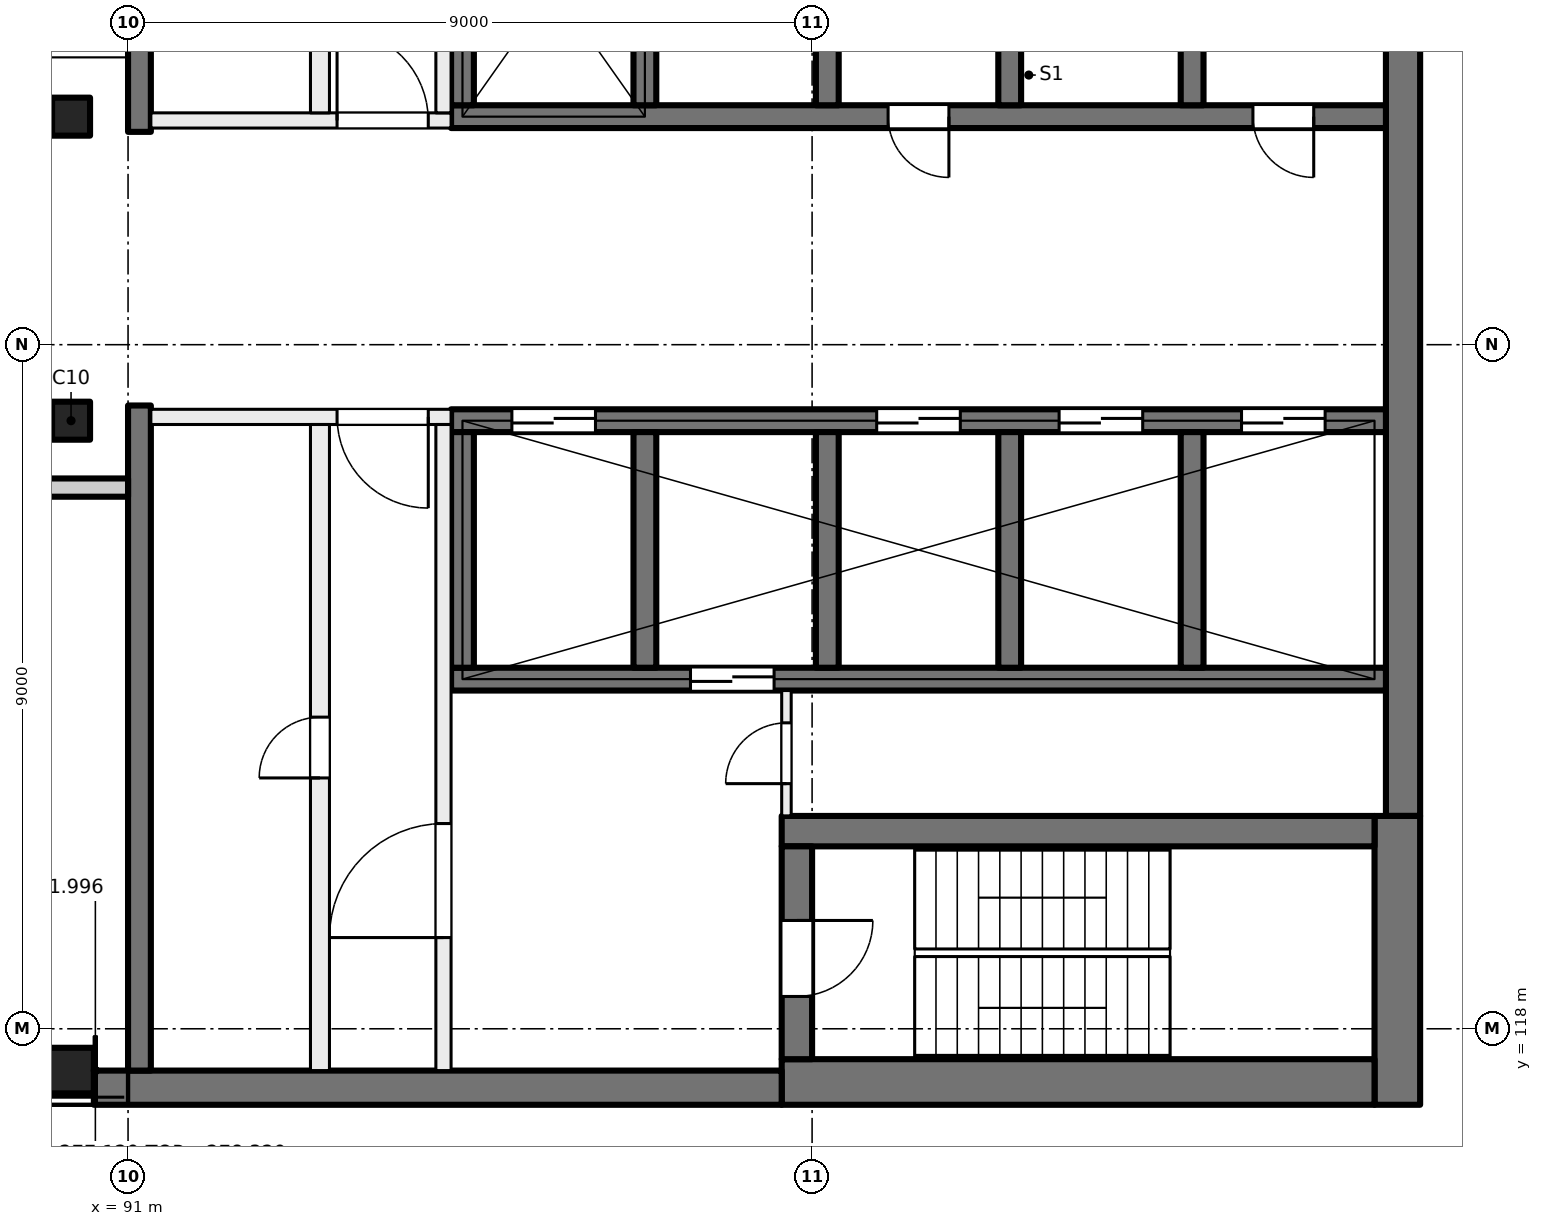
"""IFC4 building model, lengths in metres.
Left out: names, types, materials, properties, quantities, classifications, styles, units other than length and angle.
Written with IfcOpenShell. Run it as: python <this file> out.ifc"""

import sys

from ifc_helpers import new_model, si_unit, direction, frame, frame_2d, origin, origin_2d, place, context, subcontext, project, spatial, rectangle, extrude, element, fill, save


model = new_model("IFC4")
c1 = context("Model", 3, precision=1e-05, world=origin(), true_north=direction((0.0, 1.0)))
c2 = subcontext(c1, "Body", "Model", "MODEL_VIEW")
j1 = project(units=[si_unit("LENGTHUNIT", "METRE"), si_unit("PLANEANGLEUNIT", "RADIAN")], contexts=[c1])
p1 = place(None, origin())
s1 = spatial("IfcSite", under=j1, at=p1, CompositionType="ELEMENT")
p2 = place(p1, origin())
s2 = spatial("IfcBuilding", under=s1, at=p2, CompositionType="ELEMENT")
p3 = place(p2, frame((0.0, 0.0, 277.5)))
s3 = spatial("IfcBuildingStorey", under=s2, at=p3, CompositionType="ELEMENT", Elevation=277.5)
for number, where, z_axis, x_axis in (
    (1, (90.25, 130.0, 0.0), (0.0, 0.0, 1.0), (1.0, 0.0, 0.0)),
    (2, (90.25, 126.0, 0.0), (0.0, 0.0, 1.0), (1.0, 0.0, 0.0)),
):
    element("IfcColumn", number, at=place(p3, frame(where, z_axis=z_axis, x_axis=x_axis)), inside=s3, PredefinedType="COLUMN", context=c2, shape_type="SweptSolid", body=[
        extrude(rectangle(XDim=0.5, YDim=0.5, at=origin_2d()), origin(), (0.0, 0.0, 1.0), 4.5),
    ])
p4 = place(p3, frame((90.25, 117.45, 0.0), z_axis=(0.0, 0.0, 1.0), x_axis=(1.0, 0.0, 0.0)))
e3 = element("IfcColumn", 3, at=p4, inside=s3, PredefinedType="COLUMN", context=c2, shape_type="SweptSolid", body=[
    extrude(rectangle(XDim=0.6, YDim=0.6, at=origin_2d()), origin(), (0.0, 0.0, 1.0), 4.5),
])
p5 = place(p3, frame((107.775, 135.2, 0.0), z_axis=(0.0, 0.0, 1.0), x_axis=(0.0, -1.0, 0.0)))
e4 = element("IfcWall", 4, at=p5, inside=s3, PredefinedType="SHEAR", context=c2, shape_type="SweptSolid", body=[
    extrude(rectangle(XDim=14.4, YDim=0.45, at=frame_2d((7.2, 0.0))), origin(), (0.0, 0.0, 1.0), 4.5),
])
p6 = place(p3, frame((107.7, 120.8, 0.0), z_axis=(0.0, 0.0, 1.0), x_axis=(0.0, -1.0, 0.0)))
e5 = element("IfcWall", 5, at=p6, inside=s3, PredefinedType="SHEAR", context=c2, shape_type="SweptSolid", body=[
    extrude(rectangle(XDim=3.8, YDim=0.6, at=frame_2d((1.9, 0.0))), origin(), (0.0, 0.0, 1.0), 4.5),
])
p7 = place(p3, frame((107.4, 117.3, 0.0), z_axis=(0.0, 0.0, 1.0), x_axis=(-1.0, 0.0, 0.0)))
e6 = element("IfcWall", 6, at=p7, inside=s3, PredefinedType="SHEAR", context=c2, shape_type="SweptSolid", body=[
    extrude(rectangle(XDim=7.8, YDim=0.6, at=frame_2d((3.9, 0.0))), origin(), (0.0, 0.0, 1.0), 4.5),
])
p8 = place(p3, frame((99.6, 117.225, 0.0), z_axis=(0.0, 0.0, 1.0), x_axis=(-1.0, 0.0, 0.0)))
e7 = element("IfcWall", 7, at=p8, inside=s3, PredefinedType="SHEAR", context=c2, shape_type="SweptSolid", body=[
    extrude(rectangle(XDim=9.05, YDim=0.45, at=frame_2d((4.525, 0.0))), origin(), (0.0, 0.0, 1.0), 4.5),
])
p9 = place(p3, frame((107.4, 120.6, 0.0), z_axis=(0.0, 0.0, 1.0), x_axis=(-1.0, 0.0, 0.0)))
e8 = element("IfcWall", 8, at=p9, inside=s3, PredefinedType="SHEAR", context=c2, shape_type="SweptSolid", body=[
    extrude(rectangle(XDim=7.8, YDim=0.4, at=frame_2d((3.9, 0.0))), origin(), (0.0, 0.0, 1.0), 4.5),
])
p10 = place(p3, frame((99.8, 120.4, 0.0), z_axis=(0.0, 0.0, 1.0), x_axis=(0.0, -1.0, 0.0)))
e9 = element("IfcWall", 9, at=p10, inside=s3, PredefinedType="SHEAR", context=c2, shape_type="SweptSolid", body=[
    extrude(rectangle(XDim=2.8, YDim=0.4, at=frame_2d((1.4, 0.0))), origin(), (0.0, 0.0, 1.0), 4.5),
])
p11 = place(p10, frame((0.975, 0.0, 0.0)))
e10 = element("IfcOpeningElement", 10, at=p11, cuts=e9, PredefinedType="OPENING", context=c2, shape_type="SweptSolid", body=[
    extrude(rectangle(XDim=1.0, YDim=2.1, at=frame_2d((0.5, 1.05))), frame((0.0, 0.21, 0.0), z_axis=(0.0, -1.0, 0.0), x_axis=(1.0, 0.0, 0.0)), (0.0, 0.0, 1.0), 0.42),
])
p12 = place(p3, frame((107.55, 130.0, 0.0), z_axis=(0.0, 0.0, 1.0), x_axis=(-1.0, 0.0, 0.0)))
e11 = element("IfcWall", 11, at=p12, inside=s3, PredefinedType="SHEAR", context=c2, shape_type="SweptSolid", body=[
    extrude(rectangle(XDim=12.3, YDim=0.3, at=frame_2d((6.15, 0.0))), origin(), (0.0, 0.0, 1.0), 4.5),
])
p13 = place(p12, frame((0.95, 0.0, 0.0)))
e12 = element("IfcOpeningElement", 12, at=p13, cuts=e11, PredefinedType="OPENING", context=c2, shape_type="SweptSolid", body=[
    extrude(rectangle(XDim=0.8, YDim=2.1, at=frame_2d((0.4, 1.05))), frame((0.0, 0.16, 0.0), z_axis=(0.0, -1.0, 0.0), x_axis=(1.0, 0.0, 0.0)), (0.0, 0.0, 1.0), 0.32),
])
p14 = place(p12, frame((5.75, 0.0, 0.0)))
e13 = element("IfcOpeningElement", 13, at=p14, cuts=e11, PredefinedType="OPENING", context=c2, shape_type="SweptSolid", body=[
    extrude(rectangle(XDim=0.8, YDim=2.1, at=frame_2d((0.4, 1.05))), frame((0.0, 0.16, 0.0), z_axis=(0.0, -1.0, 0.0), x_axis=(1.0, 0.0, 0.0)), (0.0, 0.0, 1.0), 0.32),
])
for number, where, z_axis, x_axis in (
    (14, (105.0, 133.25, 0.0), (0.0, 0.0, 1.0), (0.0, -1.0, 0.0)),
    (15, (102.6, 133.25, 0.0), (0.0, 0.0, 1.0), (0.0, -1.0, 0.0)),
    (16, (100.2, 133.25, 0.0), (0.0, 0.0, 1.0), (0.0, -1.0, 0.0)),
    (17, (97.8, 133.25, 0.0), (0.0, 0.0, 1.0), (0.0, -1.0, 0.0)),
    (18, (95.4, 133.25, 0.0), (0.0, 0.0, 1.0), (0.0, -1.0, 0.0)),
):
    element("IfcWall", number, at=place(p3, frame(where, z_axis=z_axis, x_axis=x_axis)), inside=s3, PredefinedType="SHEAR", context=c2, shape_type="SweptSolid", body=[
        extrude(rectangle(XDim=3.1, YDim=0.3, at=frame_2d((1.55, 0.0))), origin(), (0.0, 0.0, 1.0), 4.5),
    ])
p15 = place(p3, frame((107.55, 126.0, 0.0), z_axis=(0.0, 0.0, 1.0), x_axis=(-1.0, 0.0, 0.0)))
e19 = element("IfcWall", 19, at=p15, inside=s3, PredefinedType="SHEAR", context=c2, shape_type="SweptSolid", body=[
    extrude(rectangle(XDim=12.3, YDim=0.3, at=frame_2d((6.15, 0.0))), origin(), (0.0, 0.0, 1.0), 4.5),
])
p16 = place(p15, frame((0.8, 0.0, 0.0)))
e20 = element("IfcOpeningElement", 20, at=p16, cuts=e19, PredefinedType="OPENING", context=c2, shape_type="SweptSolid", body=[
    extrude(rectangle(XDim=1.1, YDim=2.1, at=frame_2d((0.55, 1.05))), frame((0.0, 0.16, 0.0), z_axis=(0.0, -1.0, 0.0), x_axis=(1.0, 0.0, 0.0)), (0.0, 0.0, 1.0), 0.32),
])
p17 = place(p15, frame((3.2, 0.0, 0.0)))
e21 = element("IfcOpeningElement", 21, at=p17, cuts=e19, PredefinedType="OPENING", context=c2, shape_type="SweptSolid", body=[
    extrude(rectangle(XDim=1.1, YDim=2.1, at=frame_2d((0.55, 1.05))), frame((0.0, 0.16, 0.0), z_axis=(0.0, -1.0, 0.0), x_axis=(1.0, 0.0, 0.0)), (0.0, 0.0, 1.0), 0.32),
])
p18 = place(p15, frame((5.6, 0.0, 0.0)))
e22 = element("IfcOpeningElement", 22, at=p18, cuts=e19, PredefinedType="OPENING", context=c2, shape_type="SweptSolid", body=[
    extrude(rectangle(XDim=1.1, YDim=2.1, at=frame_2d((0.55, 1.05))), frame((0.0, 0.16, 0.0), z_axis=(0.0, -1.0, 0.0), x_axis=(1.0, 0.0, 0.0)), (0.0, 0.0, 1.0), 0.32),
])
p19 = place(p15, frame((10.4, 0.0, 0.0)))
e23 = element("IfcOpeningElement", 23, at=p19, cuts=e19, PredefinedType="OPENING", context=c2, shape_type="SweptSolid", body=[
    extrude(rectangle(XDim=1.1, YDim=2.1, at=frame_2d((0.55, 1.05))), frame((0.0, 0.16, 0.0), z_axis=(0.0, -1.0, 0.0), x_axis=(1.0, 0.0, 0.0)), (0.0, 0.0, 1.0), 0.32),
])
p20 = place(p3, frame((107.55, 122.6, 0.0), z_axis=(0.0, 0.0, 1.0), x_axis=(-1.0, 0.0, 0.0)))
e24 = element("IfcWall", 24, at=p20, inside=s3, PredefinedType="SHEAR", context=c2, shape_type="SweptSolid", body=[
    extrude(rectangle(XDim=12.3, YDim=0.3, at=frame_2d((6.15, 0.0))), origin(), (0.0, 0.0, 1.0), 4.5),
])
p21 = place(p20, frame((8.05, 0.0, 0.0)))
e25 = element("IfcOpeningElement", 25, at=p21, cuts=e24, PredefinedType="OPENING", context=c2, shape_type="SweptSolid", body=[
    extrude(rectangle(XDim=1.1, YDim=2.1, at=frame_2d((0.55, 1.05))), frame((0.0, 0.16, 0.0), z_axis=(0.0, -1.0, 0.0), x_axis=(1.0, 0.0, 0.0)), (0.0, 0.0, 1.0), 0.32),
])
for number, where, z_axis, x_axis in (
    (26, (105.0, 125.85, 0.0), (0.0, 0.0, 1.0), (0.0, -1.0, 0.0)),
    (27, (102.6, 125.85, 0.0), (0.0, 0.0, 1.0), (0.0, -1.0, 0.0)),
    (28, (100.2, 125.85, 0.0), (0.0, 0.0, 1.0), (0.0, -1.0, 0.0)),
    (29, (97.8, 125.85, 0.0), (0.0, 0.0, 1.0), (0.0, -1.0, 0.0)),
    (30, (95.4, 125.85, 0.0), (0.0, 0.0, 1.0), (0.0, -1.0, 0.0)),
):
    element("IfcWall", number, at=place(p3, frame(where, z_axis=z_axis, x_axis=x_axis)), inside=s3, PredefinedType="SHEAR", context=c2, shape_type="SweptSolid", body=[
        extrude(rectangle(XDim=3.1, YDim=0.3, at=frame_2d((1.55, 0.0))), origin(), (0.0, 0.0, 1.0), 4.5),
    ])
for number, where, z_axis, x_axis in (
    (31, (91.15, 138.55, 0.0), (0.0, 0.0, 1.0), (0.0, -1.0, 0.0)),
    (32, (91.15, 126.2, 0.0), (0.0, 0.0, 1.0), (0.0, -1.0, 0.0)),
):
    element("IfcWall", number, at=place(p3, frame(where, z_axis=z_axis, x_axis=x_axis)), inside=s3, PredefinedType="SHEAR", context=c2, shape_type="SweptSolid", body=[
        extrude(rectangle(XDim=8.75, YDim=0.3, at=frame_2d((4.375, 0.0))), origin(), (0.0, 0.0, 1.0), 4.5),
    ])
p22 = place(p3, frame((91.0, 125.12, 0.0), z_axis=(0.0, 0.0, 1.0), x_axis=(-1.0, 0.0, 0.0)))
e33 = element("IfcWall", 33, at=p22, inside=s3, PredefinedType="SOLIDWALL", context=c2, shape_type="SweptSolid", body=[
    extrude(rectangle(XDim=4.278, YDim=0.24, at=frame_2d((2.139, 0.0))), origin(), (0.0, 0.0, 1.0), 4.125),
])
p23 = place(p22, frame((1.239, 0.0, 0.0)))
e34 = element("IfcOpeningElement", 34, at=p23, cuts=e33, PredefinedType="OPENING", context=c2, shape_type="SweptSolid", body=[
    extrude(rectangle(XDim=1.8, YDim=2.4, at=frame_2d((0.9, 1.2))), frame((0.0, 0.13, 0.0), z_axis=(0.0, -1.0, 0.0), x_axis=(1.0, 0.0, 0.0)), (0.0, 0.0, 1.0), 0.26),
])
p24 = place(p3, frame((95.25, 126.05, 0.0), z_axis=(0.0, 0.0, 1.0), x_axis=(-1.0, 0.0, 0.0)))
e35 = element("IfcWall", 35, at=p24, inside=s3, PredefinedType="PARTITIONING", context=c2, shape_type="SweptSolid", body=[
    extrude(rectangle(XDim=3.95, YDim=0.2, at=frame_2d((1.975, 0.0))), origin(), (0.0, 0.0, 1.0), 4.125),
])
p25 = place(p24, frame((0.3, 0.0, 0.0)))
e36 = element("IfcOpeningElement", 36, at=p25, cuts=e35, PredefinedType="OPENING", context=c2, shape_type="SweptSolid", body=[
    extrude(rectangle(XDim=1.2, YDim=2.1, at=frame_2d((0.6, 1.05))), frame((0.0, 0.11, 0.0), z_axis=(0.0, -1.0, 0.0), x_axis=(1.0, 0.0, 0.0)), (0.0, 0.0, 1.0), 0.22),
])
p26 = place(p3, frame((95.15, 117.45, 0.0), z_axis=(0.0, 0.0, 1.0), x_axis=(0.0, 1.0, 0.0)))
e37 = element("IfcWall", 37, at=p26, inside=s3, PredefinedType="PARTITIONING", context=c2, shape_type="SweptSolid", body=[
    extrude(rectangle(XDim=8.5, YDim=0.2, at=frame_2d((4.25, 0.0))), origin(), (0.0, 0.0, 1.0), 4.125),
])
p27 = place(p26, frame((1.75, 0.0, 0.0)))
e38 = element("IfcOpeningElement", 38, at=p27, cuts=e37, PredefinedType="OPENING", context=c2, shape_type="SweptSolid", body=[
    extrude(rectangle(XDim=1.5, YDim=2.1, at=frame_2d((0.75, 1.05))), frame((0.0, 0.11, 0.0), z_axis=(0.0, -1.0, 0.0), x_axis=(1.0, 0.0, 0.0)), (0.0, 0.0, 1.0), 0.22),
])
p28 = place(p3, frame((93.525, 117.45, 0.0), z_axis=(0.0, 0.0, 1.0), x_axis=(0.0, 1.0, 0.0)))
e39 = element("IfcWall", 39, at=p28, inside=s3, PredefinedType="PARTITIONING", context=c2, shape_type="SweptSolid", body=[
    extrude(rectangle(XDim=8.5, YDim=0.25, at=frame_2d((4.25, 0.0))), origin(), (0.0, 0.0, 1.0), 4.125),
])
p29 = place(p28, frame((3.85, 0.0, 0.0)))
e40 = element("IfcOpeningElement", 40, at=p29, cuts=e39, PredefinedType="OPENING", context=c2, shape_type="SweptSolid", body=[
    extrude(rectangle(XDim=0.8, YDim=2.1, at=frame_2d((0.4, 1.05))), frame((0.0, 0.135, 0.0), z_axis=(0.0, -1.0, 0.0), x_axis=(1.0, 0.0, 0.0)), (0.0, 0.0, 1.0), 0.27),
])
p30 = place(p3, frame((99.663, 120.8, 0.0), z_axis=(0.0, 0.0, 1.0), x_axis=(0.0, 1.0, 0.0)))
e41 = element("IfcWall", 41, at=p30, inside=s3, PredefinedType="PARTITIONING", context=c2, shape_type="SweptSolid", body=[
    extrude(rectangle(XDim=1.65, YDim=0.125, at=frame_2d((0.825, 0.0))), origin(), (0.0, 0.0, 1.0), 4.125),
])
p31 = place(p30, frame((0.425, 0.0, 0.0)))
e42 = element("IfcOpeningElement", 42, at=p31, cuts=e41, PredefinedType="OPENING", context=c2, shape_type="SweptSolid", body=[
    extrude(rectangle(XDim=0.8, YDim=2.1, at=frame_2d((0.4, 1.05))), frame((0.0, 0.073, 0.0), z_axis=(0.0, -1.0, 0.0), x_axis=(1.0, 0.0, 0.0)), (0.0, 0.0, 1.0), 0.145),
])
p32 = place(p3, frame((91.3, 129.95, 0.0), z_axis=(0.0, 0.0, 1.0), x_axis=(1.0, 0.0, 0.0)))
e43 = element("IfcWall", 43, at=p32, inside=s3, PredefinedType="PARTITIONING", context=c2, shape_type="SweptSolid", body=[
    extrude(rectangle(XDim=3.95, YDim=0.2, at=frame_2d((1.975, 0.0))), origin(), (0.0, 0.0, 1.0), 4.125),
])
p33 = place(p32, frame((2.45, 0.0, 0.0)))
e44 = element("IfcOpeningElement", 44, at=p33, cuts=e43, PredefinedType="OPENING", context=c2, shape_type="SweptSolid", body=[
    extrude(rectangle(XDim=1.2, YDim=2.1, at=frame_2d((0.6, 1.05))), frame((0.0, 0.11, 0.0), z_axis=(0.0, -1.0, 0.0), x_axis=(1.0, 0.0, 0.0)), (0.0, 0.0, 1.0), 0.22),
])
p34 = place(p3, frame((95.15, 130.05, 0.0), z_axis=(0.0, 0.0, 1.0), x_axis=(0.0, 1.0, 0.0)))
e45 = element("IfcWall", 45, at=p34, inside=s3, PredefinedType="PARTITIONING", context=c2, shape_type="SweptSolid", body=[
    extrude(rectangle(XDim=8.5, YDim=0.2, at=frame_2d((4.25, 0.0))), origin(), (0.0, 0.0, 1.0), 4.125),
])
p35 = place(p34, frame((5.25, 0.0, 0.0)))
e46 = element("IfcOpeningElement", 46, at=p35, cuts=e45, PredefinedType="OPENING", context=c2, shape_type="SweptSolid", body=[
    extrude(rectangle(XDim=1.5, YDim=2.1, at=frame_2d((0.75, 1.05))), frame((0.0, 0.11, 0.0), z_axis=(0.0, -1.0, 0.0), x_axis=(1.0, 0.0, 0.0)), (0.0, 0.0, 1.0), 0.22),
])
p36 = place(p3, frame((93.525, 130.05, 0.0), z_axis=(0.0, 0.0, 1.0), x_axis=(0.0, 1.0, 0.0)))
e47 = element("IfcWall", 47, at=p36, inside=s3, PredefinedType="PARTITIONING", context=c2, shape_type="SweptSolid", body=[
    extrude(rectangle(XDim=8.5, YDim=0.25, at=frame_2d((4.25, 0.0))), origin(), (0.0, 0.0, 1.0), 4.125),
])
p37 = place(p36, frame((0.99, 0.0, 0.0)))
e48 = element("IfcOpeningElement", 48, at=p37, cuts=e47, PredefinedType="OPENING", context=c2, shape_type="SweptSolid", body=[
    extrude(rectangle(XDim=0.8, YDim=2.1, at=frame_2d((0.4, 1.05))), frame((0.0, 0.135, 0.0), z_axis=(0.0, -1.0, 0.0), x_axis=(1.0, 0.0, 0.0)), (0.0, 0.0, 1.0), 0.27),
])
p38 = place(p36, frame((5.29, 0.0, 0.0)))
e49 = element("IfcOpeningElement", 49, at=p38, cuts=e47, PredefinedType="OPENING", context=c2, shape_type="SweptSolid", body=[
    extrude(rectangle(XDim=0.8, YDim=2.1, at=frame_2d((0.4, 1.05))), frame((0.0, 0.135, 0.0), z_axis=(0.0, -1.0, 0.0), x_axis=(1.0, 0.0, 0.0)), (0.0, 0.0, 1.0), 0.27),
])
p39 = place(p16, origin())
e50 = element("IfcDoor", 50, at=p39, inside=s3, OperationType="DOUBLE_DOOR_SLIDING", PredefinedType="DOOR", context=c2, shape_type="SweptSolid", body=[
    extrude(rectangle(XDim=1.1, YDim=2.1, at=frame_2d((0.55, 1.05))), frame((0.0, 0.025, 0.0), z_axis=(0.0, -1.0, 0.0), x_axis=(1.0, 0.0, 0.0)), (0.0, 0.0, 1.0), 0.05),
])
fill(e20, e50)
p40 = place(p17, origin())
e51 = element("IfcDoor", 51, at=p40, inside=s3, OperationType="DOUBLE_DOOR_SLIDING", PredefinedType="DOOR", context=c2, shape_type="SweptSolid", body=[
    extrude(rectangle(XDim=1.1, YDim=2.1, at=frame_2d((0.55, 1.05))), frame((0.0, 0.025, 0.0), z_axis=(0.0, -1.0, 0.0), x_axis=(1.0, 0.0, 0.0)), (0.0, 0.0, 1.0), 0.05),
])
fill(e21, e51)
p41 = place(p18, origin())
e52 = element("IfcDoor", 52, at=p41, inside=s3, OperationType="DOUBLE_DOOR_SLIDING", PredefinedType="DOOR", context=c2, shape_type="SweptSolid", body=[
    extrude(rectangle(XDim=1.1, YDim=2.1, at=frame_2d((0.55, 1.05))), frame((0.0, 0.025, 0.0), z_axis=(0.0, -1.0, 0.0), x_axis=(1.0, 0.0, 0.0)), (0.0, 0.0, 1.0), 0.05),
])
fill(e22, e52)
p42 = place(p19, origin())
e53 = element("IfcDoor", 53, at=p42, inside=s3, OperationType="DOUBLE_DOOR_SLIDING", PredefinedType="DOOR", context=c2, shape_type="SweptSolid", body=[
    extrude(rectangle(XDim=1.1, YDim=2.1, at=frame_2d((0.55, 1.05))), frame((0.0, 0.025, 0.0), z_axis=(0.0, -1.0, 0.0), x_axis=(1.0, 0.0, 0.0)), (0.0, 0.0, 1.0), 0.05),
])
fill(e23, e53)
p43 = place(p13, origin())
e54 = element("IfcDoor", 54, at=p43, inside=s3, OperationType="SINGLE_SWING_LEFT", PredefinedType="DOOR", context=c2, shape_type="SweptSolid", body=[
    extrude(rectangle(XDim=0.8, YDim=2.1, at=frame_2d((0.4, 1.05))), frame((0.0, 0.025, 0.0), z_axis=(0.0, -1.0, 0.0), x_axis=(1.0, 0.0, 0.0)), (0.0, 0.0, 1.0), 0.05),
])
fill(e12, e54)
p44 = place(p14, origin())
e55 = element("IfcDoor", 55, at=p44, inside=s3, OperationType="SINGLE_SWING_RIGHT", PredefinedType="DOOR", context=c2, shape_type="SweptSolid", body=[
    extrude(rectangle(XDim=0.8, YDim=2.1, at=frame_2d((0.4, 1.05))), frame((0.0, 0.025, 0.0), z_axis=(0.0, -1.0, 0.0), x_axis=(1.0, 0.0, 0.0)), (0.0, 0.0, 1.0), 0.05),
])
fill(e13, e55)
p45 = place(p25, origin())
e56 = element("IfcDoor", 56, at=p45, inside=s3, OperationType="DOUBLE_DOOR_SINGLE_SWING", PredefinedType="DOOR", context=c2, shape_type="SweptSolid", body=[
    extrude(rectangle(XDim=1.2, YDim=2.1, at=frame_2d((0.6, 1.05))), frame((0.0, 0.025, 0.0), z_axis=(0.0, -1.0, 0.0), x_axis=(1.0, 0.0, 0.0)), (0.0, 0.0, 1.0), 0.05),
])
fill(e36, e56)
p46 = place(p27, origin())
e57 = element("IfcDoor", 57, at=p46, inside=s3, OperationType="DOUBLE_DOOR_SINGLE_SWING", PredefinedType="DOOR", context=c2, shape_type="SweptSolid", body=[
    extrude(rectangle(XDim=1.5, YDim=2.1, at=frame_2d((0.75, 1.05))), frame((0.0, 0.025, 0.0), z_axis=(0.0, -1.0, 0.0), x_axis=(1.0, 0.0, 0.0)), (0.0, 0.0, 1.0), 0.05),
])
fill(e38, e57)
p47 = place(p11, origin())
e58 = element("IfcDoor", 58, at=p47, inside=s3, OperationType="SINGLE_SWING_LEFT", PredefinedType="DOOR", context=c2, shape_type="SweptSolid", body=[
    extrude(rectangle(XDim=1.0, YDim=2.1, at=frame_2d((0.5, 1.05))), frame((0.0, 0.025, 0.0), z_axis=(0.0, -1.0, 0.0), x_axis=(1.0, 0.0, 0.0)), (0.0, 0.0, 1.0), 0.05),
])
fill(e10, e58)
p48 = place(p31, origin())
e59 = element("IfcDoor", 59, at=p48, inside=s3, OperationType="SINGLE_SWING_RIGHT", PredefinedType="DOOR", context=c2, shape_type="SweptSolid", body=[
    extrude(rectangle(XDim=0.8, YDim=2.1, at=frame_2d((0.4, 1.05))), frame((0.0, 0.025, 0.0), z_axis=(0.0, -1.0, 0.0), x_axis=(1.0, 0.0, 0.0)), (0.0, 0.0, 1.0), 0.05),
])
fill(e42, e59)
p49 = place(p29, origin())
e60 = element("IfcDoor", 60, at=p49, inside=s3, OperationType="SINGLE_SWING_LEFT", PredefinedType="DOOR", context=c2, shape_type="SweptSolid", body=[
    extrude(rectangle(XDim=0.8, YDim=2.1, at=frame_2d((0.4, 1.05))), frame((0.0, 0.025, 0.0), z_axis=(0.0, -1.0, 0.0), x_axis=(1.0, 0.0, 0.0)), (0.0, 0.0, 1.0), 0.05),
])
fill(e40, e60)
p50 = place(p33, origin())
e61 = element("IfcDoor", 61, at=p50, inside=s3, OperationType="DOUBLE_DOOR_SINGLE_SWING", PredefinedType="DOOR", context=c2, shape_type="SweptSolid", body=[
    extrude(rectangle(XDim=1.2, YDim=2.1, at=frame_2d((0.6, 1.05))), frame((0.0, 0.025, 0.0), z_axis=(0.0, -1.0, 0.0), x_axis=(1.0, 0.0, 0.0)), (0.0, 0.0, 1.0), 0.05),
])
fill(e44, e61)
p51 = place(p21, origin())
e62 = element("IfcDoor", 62, at=p51, inside=s3, OperationType="DOUBLE_DOOR_SLIDING", PredefinedType="DOOR", context=c2, shape_type="SweptSolid", body=[
    extrude(rectangle(XDim=1.1, YDim=2.1, at=frame_2d((0.55, 1.05))), frame((0.0, 0.025, 0.0), z_axis=(0.0, -1.0, 0.0), x_axis=(1.0, 0.0, 0.0)), (0.0, 0.0, 1.0), 0.05),
])
fill(e25, e62)
save(model, sys.argv[1])
